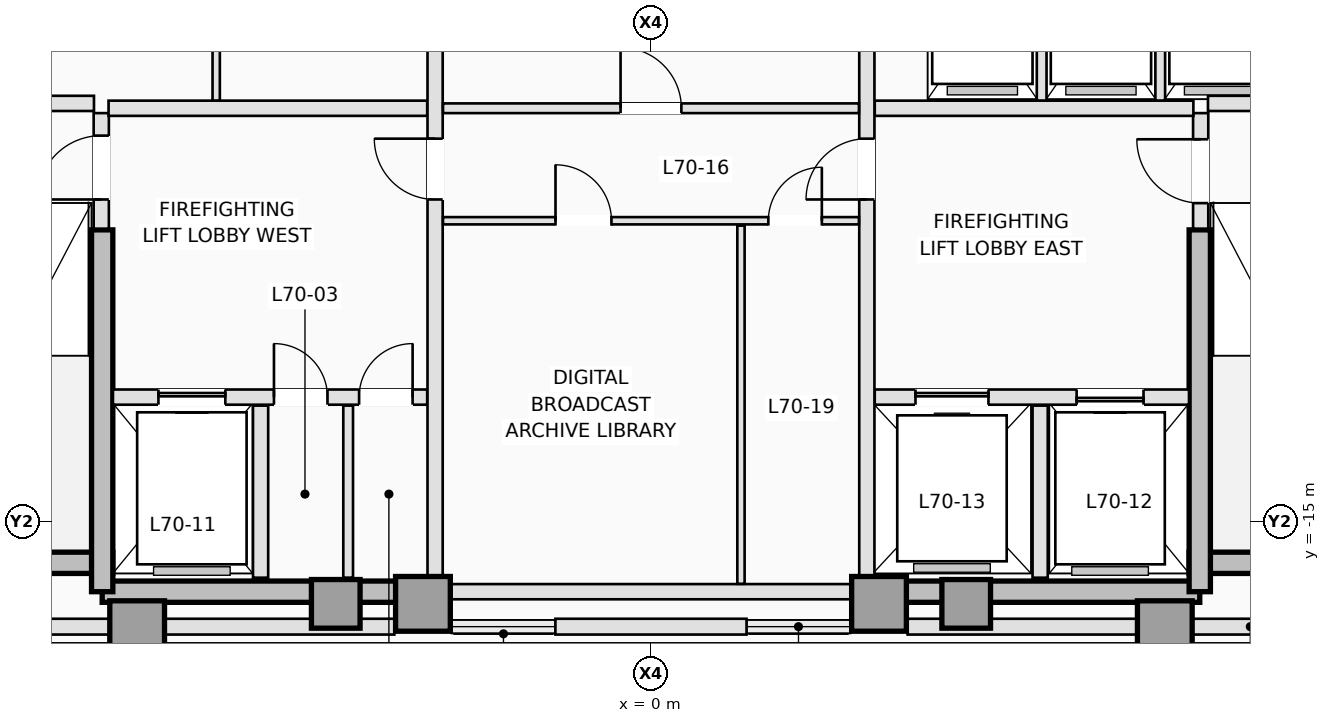
"""IFC4 building model, lengths in metres.
Left out: names, types, materials, properties, quantities, classifications, styles, units other than length and angle.
Written with IfcOpenShell. Run it as: python <this file> out.ifc"""

import sys

from ifc_helpers import new_model, si_unit, direction, frame, frame_2d, origin, origin_2d, place, context, subcontext, project, spatial, rectangle, extrude, element, fill, save


model = new_model("IFC4")
c1 = context("Model", 3, precision=1e-05, world=origin(), true_north=direction((0.0, 1.0)))
c2 = subcontext(c1, "Body", "Model", "MODEL_VIEW")
j1 = project(units=[si_unit("LENGTHUNIT", "METRE"), si_unit("PLANEANGLEUNIT", "RADIAN")], contexts=[c1])
p1 = place(None, origin())
s1 = spatial("IfcSite", under=j1, at=p1, CompositionType="ELEMENT")
p2 = place(p1, origin())
s2 = spatial("IfcBuilding", under=s1, at=p2, CompositionType="ELEMENT")
p3 = place(p2, frame((0.0, 0.0, 253.4)))
s3 = spatial("IfcBuildingStorey", under=s2, at=p3, CompositionType="ELEMENT", Elevation=253.4)
p4 = place(p3, frame((-12.55, -15.675, 0.0), z_axis=(0.0, 0.0, 1.0), x_axis=(1.0, 0.0, 0.0)))
e1 = element("IfcWall", 1, at=p4, inside=s3, PredefinedType="SHEAR", context=c2, shape_type="SweptSolid", body=[
    extrude(rectangle(XDim=3.7, YDim=0.35, at=frame_2d((1.85, 0.0))), origin(), (0.0, 0.0, 1.0), 3.5),
])
for number, where, z_axis, x_axis in (
    (2, (-9.025, -16.15, 0.0), (0.0, 0.0, 1.0), (1.0, 0.0, 0.0)),
    (3, (3.75, -16.15, 0.0), (0.0, 0.0, 1.0), (1.0, 0.0, 0.0)),
):
    element("IfcWall", number, at=place(p3, frame(where, z_axis=z_axis, x_axis=x_axis)), inside=s3, PredefinedType="SHEAR", context=c2, shape_type="SweptSolid", body=[
        extrude(rectangle(XDim=5.275, YDim=0.35, at=frame_2d((2.637, 0.0))), origin(), (0.0, 0.0, 1.0), 3.5),
    ])
p5 = place(p3, frame((8.85, -15.675, 0.0), z_axis=(0.0, 0.0, 1.0), x_axis=(1.0, 0.0, 0.0)))
e4 = element("IfcWall", 4, at=p5, inside=s3, PredefinedType="SHEAR", context=c2, shape_type="SweptSolid", body=[
    extrude(rectangle(XDim=3.7, YDim=0.35, at=frame_2d((1.85, 0.0))), origin(), (0.0, 0.0, 1.0), 3.5),
])
for number, where, z_axis, x_axis in (
    (5, (-9.025, -16.15, 0.0), (0.0, 0.0, 1.0), (0.0, 1.0, 0.0)),
    (6, (9.025, -16.15, 0.0), (0.0, 0.0, 1.0), (0.0, 1.0, 0.0)),
):
    element("IfcWall", number, at=place(p3, frame(where, z_axis=z_axis, x_axis=x_axis)), inside=s3, PredefinedType="SHEAR", context=c2, shape_type="SweptSolid", body=[
        extrude(rectangle(XDim=5.95, YDim=0.35, at=frame_2d((2.975, 0.0))), origin(), (0.0, 0.0, 1.0), 3.5),
    ])
for number, where, z_axis, x_axis in (
    (7, (-8.45, -16.75, 0.0), (0.0, 0.0, 1.0), (1.0, 0.0, 0.0)),
    (8, (-3.75, -16.35, 0.0), (0.0, 0.0, 1.0), (1.0, 0.0, 0.0)),
    (9, (3.75, -16.35, 0.0), (0.0, 0.0, 1.0), (1.0, 0.0, 0.0)),
    (10, (8.45, -16.75, 0.0), (0.0, 0.0, 1.0), (1.0, 0.0, 0.0)),
):
    element("IfcColumn", number, at=place(p3, frame(where, z_axis=z_axis, x_axis=x_axis)), inside=s3, PredefinedType="COLUMN", context=c2, shape_type="SweptSolid", body=[
        extrude(rectangle(XDim=0.9, YDim=0.9, at=origin_2d()), origin(), (0.0, 0.0, 1.0), 3.5),
    ])
for number, where, z_axis, x_axis in (
    (11, (-5.184, -16.35, 0.0), (0.0, 0.0, 1.0), (0.0, 1.0, 0.0)),
    (12, (5.184, -16.35, 0.0), (0.0, 0.0, 1.0), (0.0, 1.0, 0.0)),
):
    element("IfcColumn", number, at=place(p3, frame(where, z_axis=z_axis, x_axis=x_axis)), inside=s3, PredefinedType="COLUMN", context=c2, shape_type="SweptSolid", body=[
        extrude(rectangle(XDim=0.8, YDim=0.8, at=origin_2d()), origin(), (0.0, 0.0, 1.0), 3.5),
    ])
for number, where, z_axis, x_axis in (
    (13, (15.493, -16.725, 0.0), (0.0, 0.0, 1.0), (-1.0, 0.0, 0.0)),
    (14, (-4.22, -16.725, 0.0), (0.0, 0.0, 1.0), (-1.0, 0.0, 0.0)),
):
    element("IfcWall", number, at=place(p3, frame(where, z_axis=z_axis, x_axis=x_axis)), inside=s3, PredefinedType="STANDARD", context=c2, shape_type="SweptSolid", body=[
        extrude(rectangle(XDim=11.273, YDim=0.26, at=frame_2d((5.636, 0.0))), origin(), (0.0, 0.0, 1.0), 2.79),
    ])
p6 = place(p3, frame((1.572, -16.725, 0.0), z_axis=(0.0, 0.0, 1.0), x_axis=(-1.0, 0.0, 0.0)))
e15 = element("IfcWall", 15, at=p6, inside=s3, PredefinedType="STANDARD", context=c2, shape_type="SweptSolid", body=[
    extrude(rectangle(XDim=3.143, YDim=0.26, at=frame_2d((1.572, 0.0))), origin(), (0.0, 0.0, 1.0), 3.25),
])
p7 = place(p3, frame((-9.04, -10.18, 0.0), z_axis=(0.0, 0.0, 1.0), x_axis=(0.0, 1.0, 0.0)))
e16 = element("IfcWall", 16, at=p7, inside=s3, PredefinedType="PARTITIONING", context=c2, shape_type="SweptSolid", body=[
    extrude(rectangle(XDim=1.9, YDim=0.25, at=frame_2d((0.95, 0.0))), origin(), (0.0, 0.0, 1.0), 3.25),
])
p8 = place(p7, frame((0.48, 0.0, 0.0)))
e17 = element("IfcOpeningElement", 17, at=p8, cuts=e16, PredefinedType="OPENING", context=c2, shape_type="SweptSolid", body=[
    extrude(rectangle(XDim=1.05, YDim=2.15, at=frame_2d((0.525, 1.075))), frame((0.0, 0.135, 0.0), z_axis=(0.0, -1.0, 0.0), x_axis=(1.0, 0.0, 0.0)), (0.0, 0.0, 1.0), 0.27),
])
p9 = place(p3, frame((9.04, -10.18, 0.0), z_axis=(0.0, 0.0, 1.0), x_axis=(0.0, 1.0, 0.0)))
e18 = element("IfcWall", 18, at=p9, inside=s3, PredefinedType="PARTITIONING", context=c2, shape_type="SweptSolid", body=[
    extrude(rectangle(XDim=1.9, YDim=0.25, at=frame_2d((0.95, 0.0))), origin(), (0.0, 0.0, 1.0), 3.25),
])
p10 = place(p9, frame((0.42, 0.0, 0.0)))
e19 = element("IfcOpeningElement", 19, at=p10, cuts=e18, PredefinedType="OPENING", context=c2, shape_type="SweptSolid", body=[
    extrude(rectangle(XDim=1.05, YDim=2.15, at=frame_2d((0.525, 1.075))), frame((0.0, 0.135, 0.0), z_axis=(0.0, -1.0, 0.0), x_axis=(1.0, 0.0, 0.0)), (0.0, 0.0, 1.0), 0.27),
])
for number, where, z_axis, x_axis in (
    (20, (-12.38, -8.12, 0.0), (0.0, 0.0, 1.0), (1.0, 0.0, 0.0)),
    (21, (9.16, -8.12, 0.0), (0.0, 0.0, 1.0), (1.0, 0.0, 0.0)),
):
    element("IfcWall", number, at=place(p3, frame(where, z_axis=z_axis, x_axis=x_axis)), inside=s3, PredefinedType="PARTITIONING", context=c2, shape_type="SweptSolid", body=[
        extrude(rectangle(XDim=3.22, YDim=0.25, at=frame_2d((1.61, 0.0))), origin(), (0.0, 0.0, 1.0), 3.25),
    ])
p11 = place(p3, frame((-8.848, -12.95, 0.0), z_axis=(0.0, 0.0, 1.0), x_axis=(1.0, 0.0, 0.0)))
e22 = element("IfcWall", 22, at=p11, inside=s3, PredefinedType="PARTITIONING", context=c2, shape_type="SweptSolid", body=[
    extrude(rectangle(XDim=5.168, YDim=0.25, at=frame_2d((2.584, 0.0))), origin(), (0.0, 0.0, 1.0), 3.25),
])
p12 = place(p11, frame((0.748, 0.0, 0.0)))
e23 = element("IfcOpeningElement", 23, at=p12, cuts=e22, PredefinedType="OPENING", context=c2, shape_type="SweptSolid", body=[
    extrude(rectangle(XDim=1.1, YDim=2.15, at=frame_2d((0.55, 1.075))), frame((0.0, 0.135, 0.0), z_axis=(0.0, -1.0, 0.0), x_axis=(1.0, 0.0, 0.0)), (0.0, 0.0, 1.0), 0.27),
])
p13 = place(p11, frame((2.648, 0.0, 0.0)))
e24 = element("IfcOpeningElement", 24, at=p13, cuts=e22, PredefinedType="OPENING", context=c2, shape_type="SweptSolid", body=[
    extrude(rectangle(XDim=0.88, YDim=2.1, at=frame_2d((0.44, 1.05))), frame((0.0, 0.135, 0.0), z_axis=(0.0, -1.0, 0.0), x_axis=(1.0, 0.0, 0.0)), (0.0, 0.0, 1.0), 0.27),
])
p14 = place(p11, frame((4.048, 0.0, 0.0)))
e25 = element("IfcOpeningElement", 25, at=p14, cuts=e22, PredefinedType="OPENING", context=c2, shape_type="SweptSolid", body=[
    extrude(rectangle(XDim=0.88, YDim=2.1, at=frame_2d((0.44, 1.05))), frame((0.0, 0.135, 0.0), z_axis=(0.0, -1.0, 0.0), x_axis=(1.0, 0.0, 0.0)), (0.0, 0.0, 1.0), 0.27),
])
p15 = place(p3, frame((3.68, -12.95, 0.0), z_axis=(0.0, 0.0, 1.0), x_axis=(1.0, 0.0, 0.0)))
e26 = element("IfcWall", 26, at=p15, inside=s3, PredefinedType="PARTITIONING", context=c2, shape_type="SweptSolid", body=[
    extrude(rectangle(XDim=5.168, YDim=0.25, at=frame_2d((2.584, 0.0))), origin(), (0.0, 0.0, 1.0), 3.25),
])
p16 = place(p15, frame((3.32, 0.0, 0.0)))
e27 = element("IfcOpeningElement", 27, at=p16, cuts=e26, PredefinedType="OPENING", context=c2, shape_type="SweptSolid", body=[
    extrude(rectangle(XDim=1.1, YDim=2.15, at=frame_2d((0.55, 1.075))), frame((0.0, 0.135, 0.0), z_axis=(0.0, -1.0, 0.0), x_axis=(1.0, 0.0, 0.0)), (0.0, 0.0, 1.0), 0.27),
])
p17 = place(p15, frame((0.67, 0.0, 0.0)))
e28 = element("IfcOpeningElement", 28, at=p17, cuts=e26, PredefinedType="OPENING", context=c2, shape_type="SweptSolid", body=[
    extrude(rectangle(XDim=1.2, YDim=2.15, at=frame_2d((0.6, 1.075))), frame((0.0, 0.135, 0.0), z_axis=(0.0, -1.0, 0.0), x_axis=(1.0, 0.0, 0.0)), (0.0, 0.0, 1.0), 0.27),
])
p18 = place(p3, frame((-6.42, -15.92, 0.0), z_axis=(0.0, 0.0, 1.0), x_axis=(0.0, 1.0, 0.0)))
e29 = element("IfcWall", 29, at=p18, inside=s3, PredefinedType="PARTITIONING", context=c2, shape_type="SweptSolid", body=[
    extrude(rectangle(XDim=2.83, YDim=0.25, at=frame_2d((1.415, 0.0))), origin(), (0.0, 0.0, 1.0), 3.25),
])
p19 = place(p3, frame((-4.98, -15.92, 0.0), z_axis=(0.0, 0.0, 1.0), x_axis=(0.0, 1.0, 0.0)))
e30 = element("IfcWall", 30, at=p19, inside=s3, PredefinedType="PARTITIONING", context=c2, shape_type="SweptSolid", body=[
    extrude(rectangle(XDim=2.83, YDim=0.16, at=frame_2d((1.415, 0.0))), origin(), (0.0, 0.0, 1.0), 3.25),
])
p20 = place(p3, frame((6.4, -15.92, 0.0), z_axis=(0.0, 0.0, 1.0), x_axis=(0.0, 1.0, 0.0)))
e31 = element("IfcWall", 31, at=p20, inside=s3, PredefinedType="PARTITIONING", context=c2, shape_type="SweptSolid", body=[
    extrude(rectangle(XDim=2.83, YDim=0.25, at=frame_2d((1.415, 0.0))), origin(), (0.0, 0.0, 1.0), 3.25),
])
for number, where, z_axis, x_axis in (
    (32, (-8.92, -8.2, 0.0), (0.0, 0.0, 1.0), (1.0, 0.0, 0.0)),
    (33, (3.68, -8.2, 0.0), (0.0, 0.0, 1.0), (1.0, 0.0, 0.0)),
):
    element("IfcWall", number, at=place(p3, frame(where, z_axis=z_axis, x_axis=x_axis)), inside=s3, PredefinedType="PARTITIONING", context=c2, shape_type="SweptSolid", body=[
        extrude(rectangle(XDim=5.24, YDim=0.25, at=frame_2d((2.62, 0.0))), origin(), (0.0, 0.0, 1.0), 3.25),
    ])
p21 = place(p3, frame((-3.55, -15.898, 0.0), z_axis=(0.0, 0.0, 1.0), x_axis=(0.0, 1.0, 0.0)))
e34 = element("IfcWall", 34, at=p21, inside=s3, PredefinedType="PARTITIONING", context=c2, shape_type="SweptSolid", body=[
    extrude(rectangle(XDim=10.558, YDim=0.25, at=frame_2d((5.279, 0.0))), origin(), (0.0, 0.0, 1.0), 3.25),
])
p22 = place(p21, frame((6.198, 0.0, 0.0)))
e35 = element("IfcOpeningElement", 35, at=p22, cuts=e34, PredefinedType="OPENING", context=c2, shape_type="SweptSolid", body=[
    extrude(rectangle(XDim=1.0, YDim=2.15, at=frame_2d((0.5, 1.075))), frame((0.0, 0.135, 0.0), z_axis=(0.0, -1.0, 0.0), x_axis=(1.0, 0.0, 0.0)), (0.0, 0.0, 1.0), 0.27),
])
p23 = place(p3, frame((3.55, -15.898, 0.0), z_axis=(0.0, 0.0, 1.0), x_axis=(0.0, 1.0, 0.0)))
e36 = element("IfcWall", 36, at=p23, inside=s3, PredefinedType="PARTITIONING", context=c2, shape_type="SweptSolid", body=[
    extrude(rectangle(XDim=10.558, YDim=0.25, at=frame_2d((5.279, 0.0))), origin(), (0.0, 0.0, 1.0), 3.25),
])
p24 = place(p23, frame((6.198, 0.0, 0.0)))
e37 = element("IfcOpeningElement", 37, at=p24, cuts=e36, PredefinedType="OPENING", context=c2, shape_type="SweptSolid", body=[
    extrude(rectangle(XDim=1.0, YDim=2.15, at=frame_2d((0.5, 1.075))), frame((0.0, 0.135, 0.0), z_axis=(0.0, -1.0, 0.0), x_axis=(1.0, 0.0, 0.0)), (0.0, 0.0, 1.0), 0.27),
])
p25 = place(p3, frame((-7.15, -8.073, 0.0), z_axis=(0.0, 0.0, 1.0), x_axis=(0.0, 1.0, 0.0)))
e38 = element("IfcWall", 38, at=p25, inside=s3, PredefinedType="PARTITIONING", context=c2, shape_type="SweptSolid", body=[
    extrude(rectangle(XDim=2.733, YDim=0.12, at=frame_2d((1.366, 0.0))), origin(), (0.0, 0.0, 1.0), 3.25),
])
for number, where, z_axis, x_axis in (
    (39, (6.425, -8.073, 0.0), (0.0, 0.0, 1.0), (0.0, 1.0, 0.0)),
    (40, (8.375, -8.073, 0.0), (0.0, 0.0, 1.0), (0.0, 1.0, 0.0)),
):
    element("IfcWall", number, at=place(p3, frame(where, z_axis=z_axis, x_axis=x_axis)), inside=s3, PredefinedType="PARTITIONING", context=c2, shape_type="SweptSolid", body=[
        extrude(rectangle(XDim=2.733, YDim=0.16, at=frame_2d((1.366, 0.0))), origin(), (0.0, 0.0, 1.0), 3.25),
    ])
p26 = place(p3, frame((-3.298, -16.15, 0.0), z_axis=(0.0, 0.0, 1.0), x_axis=(1.0, 0.0, 0.0)))
e41 = element("IfcWall", 41, at=p26, inside=s3, PredefinedType="PARTITIONING", context=c2, shape_type="SweptSolid", body=[
    extrude(rectangle(XDim=6.596, YDim=0.25, at=frame_2d((3.298, 0.0))), origin(), (0.0, 0.0, 1.0), 2.844),
])
p27 = place(p3, frame((-3.42, -8.2, 0.0), z_axis=(0.0, 0.0, 1.0), x_axis=(1.0, 0.0, 0.0)))
e42 = element("IfcWall", 42, at=p27, inside=s3, PredefinedType="PARTITIONING", context=c2, shape_type="SweptSolid", body=[
    extrude(rectangle(XDim=6.84, YDim=0.16, at=frame_2d((3.42, 0.0))), origin(), (0.0, 0.0, 1.0), 3.25),
])
p28 = place(p27, frame((2.92, 0.0, 0.0)))
e43 = element("IfcOpeningElement", 43, at=p28, cuts=e42, PredefinedType="OPENING", context=c2, shape_type="SweptSolid", body=[
    extrude(rectangle(XDim=1.0, YDim=2.15, at=frame_2d((0.5, 1.075))), frame((0.0, 0.09, 0.0), z_axis=(0.0, -1.0, 0.0), x_axis=(1.0, 0.0, 0.0)), (0.0, 0.0, 1.0), 0.18),
])
p29 = place(p3, frame((-3.42, -10.05, 0.0), z_axis=(0.0, 0.0, 1.0), x_axis=(1.0, 0.0, 0.0)))
e44 = element("IfcWall", 44, at=p29, inside=s3, PredefinedType="PARTITIONING", context=c2, shape_type="SweptSolid", body=[
    extrude(rectangle(XDim=6.84, YDim=0.12, at=frame_2d((3.42, 0.0))), origin(), (0.0, 0.0, 1.0), 3.25),
])
p30 = place(p29, frame((1.85, 0.0, 0.0)))
e45 = element("IfcOpeningElement", 45, at=p30, cuts=e44, PredefinedType="OPENING", context=c2, shape_type="SweptSolid", body=[
    extrude(rectangle(XDim=0.92, YDim=2.12, at=frame_2d((0.46, 1.06))), frame((0.0, 0.07, 0.0), z_axis=(0.0, -1.0, 0.0), x_axis=(1.0, 0.0, 0.0)), (0.0, 0.0, 1.0), 0.14),
])
p31 = place(p29, frame((5.35, 0.0, 0.0)))
e46 = element("IfcOpeningElement", 46, at=p31, cuts=e44, PredefinedType="OPENING", context=c2, shape_type="SweptSolid", body=[
    extrude(rectangle(XDim=0.88, YDim=2.12, at=frame_2d((0.44, 1.06))), frame((0.0, 0.07, 0.0), z_axis=(0.0, -1.0, 0.0), x_axis=(1.0, 0.0, 0.0)), (0.0, 0.0, 1.0), 0.14),
])
p32 = place(p3, frame((1.48, -16.02, 0.0), z_axis=(0.0, 0.0, 1.0), x_axis=(0.0, 1.0, 0.0)))
e47 = element("IfcWall", 47, at=p32, inside=s3, PredefinedType="PARTITIONING", context=c2, shape_type="SweptSolid", body=[
    extrude(rectangle(XDim=5.89, YDim=0.12, at=frame_2d((2.945, 0.0))), origin(), (0.0, 0.0, 1.0), 3.25),
])
p33 = place(p12, origin())
e48 = element("IfcDoor", 48, at=p33, inside=s3, OperationType="SLIDING_TO_LEFT", PredefinedType="DOOR", context=c2, shape_type="SweptSolid", body=[
    extrude(rectangle(XDim=1.1, YDim=2.15, at=frame_2d((0.55, 1.075))), frame((0.0, 0.025, 0.0), z_axis=(0.0, -1.0, 0.0), x_axis=(1.0, 0.0, 0.0)), (0.0, 0.0, 1.0), 0.05),
])
fill(e23, e48)
p34 = place(p16, origin())
e49 = element("IfcDoor", 49, at=p34, inside=s3, OperationType="SLIDING_TO_RIGHT", PredefinedType="DOOR", context=c2, shape_type="SweptSolid", body=[
    extrude(rectangle(XDim=1.1, YDim=2.15, at=frame_2d((0.55, 1.075))), frame((0.0, 0.025, 0.0), z_axis=(0.0, -1.0, 0.0), x_axis=(1.0, 0.0, 0.0)), (0.0, 0.0, 1.0), 0.05),
])
fill(e27, e49)
p35 = place(p17, origin())
e50 = element("IfcDoor", 50, at=p35, inside=s3, OperationType="SLIDING_TO_LEFT", PredefinedType="DOOR", context=c2, shape_type="SweptSolid", body=[
    extrude(rectangle(XDim=1.2, YDim=2.15, at=frame_2d((0.6, 1.075))), frame((0.0, 0.025, 0.0), z_axis=(0.0, -1.0, 0.0), x_axis=(1.0, 0.0, 0.0)), (0.0, 0.0, 1.0), 0.05),
])
fill(e28, e50)
p36 = place(p8, origin())
e51 = element("IfcDoor", 51, at=p36, inside=s3, OperationType="SINGLE_SWING_LEFT", PredefinedType="DOOR", context=c2, shape_type="SweptSolid", body=[
    extrude(rectangle(XDim=1.05, YDim=2.15, at=frame_2d((0.525, 1.075))), frame((0.0, 0.025, 0.0), z_axis=(0.0, -1.0, 0.0), x_axis=(1.0, 0.0, 0.0)), (0.0, 0.0, 1.0), 0.05),
])
fill(e17, e51)
p37 = place(p10, origin())
e52 = element("IfcDoor", 52, at=p37, inside=s3, OperationType="SINGLE_SWING_RIGHT", PredefinedType="DOOR", context=c2, shape_type="SweptSolid", body=[
    extrude(rectangle(XDim=1.05, YDim=2.15, at=frame_2d((0.525, 1.075))), frame((0.0, 0.025, 0.0), z_axis=(0.0, -1.0, 0.0), x_axis=(1.0, 0.0, 0.0)), (0.0, 0.0, 1.0), 0.05),
])
fill(e19, e52)
p38 = place(p13, origin())
e53 = element("IfcDoor", 53, at=p38, inside=s3, OperationType="SINGLE_SWING_LEFT", PredefinedType="TRAPDOOR", context=c2, shape_type="SweptSolid", body=[
    extrude(rectangle(XDim=0.88, YDim=2.1, at=frame_2d((0.44, 1.05))), frame((0.0, 0.025, 0.0), z_axis=(0.0, -1.0, 0.0), x_axis=(1.0, 0.0, 0.0)), (0.0, 0.0, 1.0), 0.05),
])
fill(e24, e53)
p39 = place(p14, origin())
e54 = element("IfcDoor", 54, at=p39, inside=s3, OperationType="SINGLE_SWING_RIGHT", PredefinedType="TRAPDOOR", context=c2, shape_type="SweptSolid", body=[
    extrude(rectangle(XDim=0.88, YDim=2.1, at=frame_2d((0.44, 1.05))), frame((0.0, 0.025, 0.0), z_axis=(0.0, -1.0, 0.0), x_axis=(1.0, 0.0, 0.0)), (0.0, 0.0, 1.0), 0.05),
])
fill(e25, e54)
p40 = place(p22, origin())
e55 = element("IfcDoor", 55, at=p40, inside=s3, OperationType="SINGLE_SWING_RIGHT", PredefinedType="DOOR", context=c2, shape_type="SweptSolid", body=[
    extrude(rectangle(XDim=1.0, YDim=2.15, at=frame_2d((0.5, 1.075))), frame((0.0, 0.025, 0.0), z_axis=(0.0, -1.0, 0.0), x_axis=(1.0, 0.0, 0.0)), (0.0, 0.0, 1.0), 0.05),
])
fill(e35, e55)
p41 = place(p24, origin())
e56 = element("IfcDoor", 56, at=p41, inside=s3, OperationType="SINGLE_SWING_LEFT", PredefinedType="DOOR", context=c2, shape_type="SweptSolid", body=[
    extrude(rectangle(XDim=1.0, YDim=2.15, at=frame_2d((0.5, 1.075))), frame((0.0, 0.025, 0.0), z_axis=(0.0, -1.0, 0.0), x_axis=(1.0, 0.0, 0.0)), (0.0, 0.0, 1.0), 0.05),
])
fill(e37, e56)
p42 = place(p28, origin())
e57 = element("IfcDoor", 57, at=p42, inside=s3, OperationType="SINGLE_SWING_LEFT", PredefinedType="DOOR", context=c2, shape_type="SweptSolid", body=[
    extrude(rectangle(XDim=1.0, YDim=2.15, at=frame_2d((0.5, 1.075))), frame((0.0, 0.025, 0.0), z_axis=(0.0, -1.0, 0.0), x_axis=(1.0, 0.0, 0.0)), (0.0, 0.0, 1.0), 0.05),
])
fill(e43, e57)
p43 = place(p30, origin())
e58 = element("IfcDoor", 58, at=p43, inside=s3, OperationType="SINGLE_SWING_LEFT", PredefinedType="DOOR", context=c2, shape_type="SweptSolid", body=[
    extrude(rectangle(XDim=0.92, YDim=2.12, at=frame_2d((0.46, 1.06))), frame((0.0, 0.025, 0.0), z_axis=(0.0, -1.0, 0.0), x_axis=(1.0, 0.0, 0.0)), (0.0, 0.0, 1.0), 0.05),
])
fill(e45, e58)
p44 = place(p31, origin())
e59 = element("IfcDoor", 59, at=p44, inside=s3, OperationType="SINGLE_SWING_RIGHT", PredefinedType="DOOR", context=c2, shape_type="SweptSolid", body=[
    extrude(rectangle(XDim=0.88, YDim=2.12, at=frame_2d((0.44, 1.06))), frame((0.0, 0.025, 0.0), z_axis=(0.0, -1.0, 0.0), x_axis=(1.0, 0.0, 0.0)), (0.0, 0.0, 1.0), 0.05),
])
fill(e46, e59)
save(model, sys.argv[1])
